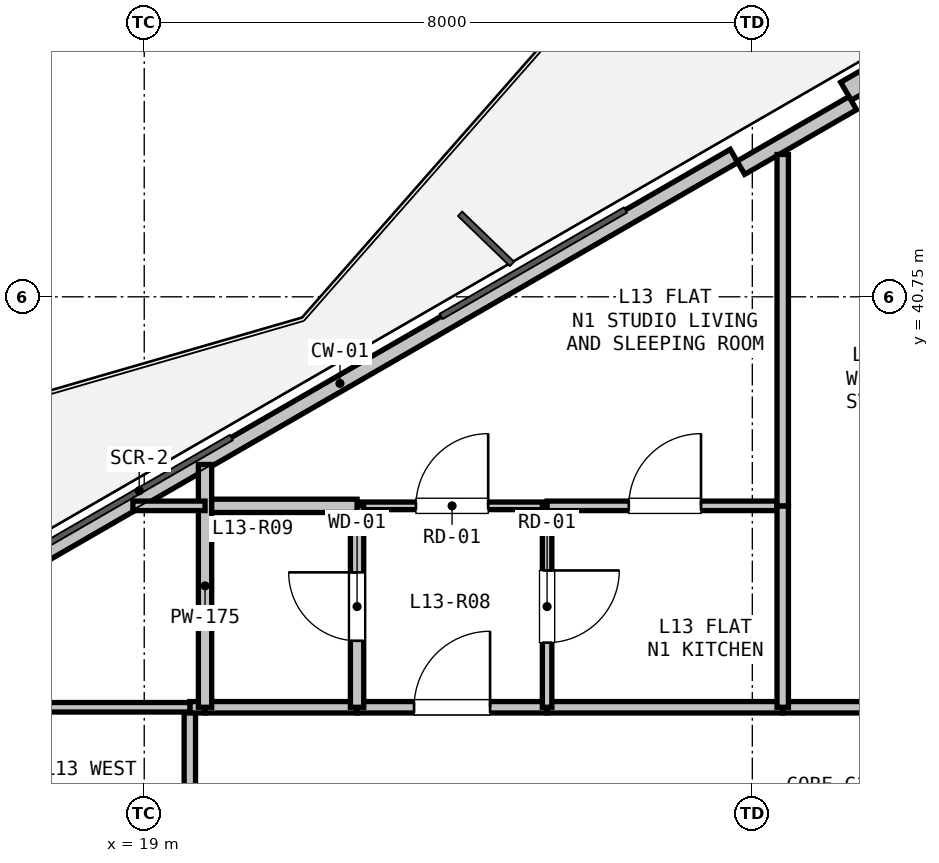
"""IFC4 building model, lengths in metres.
Left out: names, types, materials, properties, quantities, classifications, styles, units other than length and angle.
Written with IfcOpenShell. Run it as: python <this file> out.ifc"""

import sys

from ifc_helpers import new_model, si_unit, direction, frame, frame_2d, origin, place, context, subcontext, project, spatial, rectangle, extrude, element, fill, save


model = new_model("IFC4")
c1 = context("Model", 3, precision=1e-05, world=origin(), true_north=direction((0.0, 1.0)))
c2 = subcontext(c1, "Body", "Model", "MODEL_VIEW")
j1 = project(units=[si_unit("LENGTHUNIT", "METRE"), si_unit("PLANEANGLEUNIT", "RADIAN")], contexts=[c1])
p1 = place(None, origin())
s1 = spatial("IfcSite", under=j1, at=p1, CompositionType="ELEMENT")
p2 = place(p1, origin())
s2 = spatial("IfcBuilding", under=s1, at=p2, CompositionType="ELEMENT")
p3 = place(p2, frame((0.0, 0.0, 48.9)))
s3 = spatial("IfcBuildingStorey", under=s2, at=p3, CompositionType="ELEMENT", Elevation=48.9)
p4 = place(p3, frame((16.39, 36.617, 0.0), z_axis=(0.0, 0.0, 1.0), x_axis=(0.866027351828, 0.499996625875, 0.0)))
e1 = element("IfcWall", 1, at=p4, inside=s3, PredefinedType="PARAPET", context=c2, shape_type="SweptSolid", body=[
    extrude(rectangle(XDim=11.973, YDim=0.2, at=frame_2d((5.987, 0.0))), origin(), (0.0, 0.0, 1.0), 0.2),
])
p5 = place(p3, frame((28.232, 43.454, 0.0), z_axis=(0.0, 0.0, 1.0), x_axis=(0.86603192154, 0.499988710747, 0.0)))
e2 = element("IfcWall", 2, at=p5, inside=s3, PredefinedType="SOLIDWALL", context=c2, shape_type="SweptSolid", body=[
    extrude(rectangle(XDim=12.673, YDim=0.275, at=frame_2d((6.336, 0.0))), origin(), (0.0, 0.0, 1.0), 2.66),
])
p6 = place(p5, frame((7.294, 0.0, 0.9)))
e3 = element("IfcOpeningElement", 3, at=p6, cuts=e2, PredefinedType="OPENING", context=c2, shape_type="SweptSolid", body=[
    extrude(rectangle(XDim=1.2, YDim=1.4, at=frame_2d((0.6, 0.7))), frame((0.0, 0.147, 0.0), z_axis=(0.0, -1.0, 0.0), x_axis=(1.0, 0.0, 0.0)), (0.0, 0.0, 1.0), 0.295),
])
p7 = place(p3, frame((26.85, 42.448, 0.0), z_axis=(0.0, 0.0, 1.0), x_axis=(0.86605165483, 0.499954529098, 0.0)))
e4 = element("IfcWall", 4, at=p7, inside=s3, PredefinedType="PARAPET", context=c2, shape_type="SweptSolid", body=[
    extrude(rectangle(XDim=1.7, YDim=0.2, at=frame_2d((0.85, 0.0))), origin(), (0.0, 0.0, 1.0), 2.66),
])
p8 = place(p3, frame((19.6, 29.75, 0.0), z_axis=(0.0, 0.0, 1.0), x_axis=(0.0, 1.0, 0.0)))
e5 = element("IfcWall", 5, at=p8, inside=s3, PredefinedType="PARTITIONING", context=c2, shape_type="SweptSolid", body=[
    extrude(rectangle(XDim=5.6, YDim=0.15, at=frame_2d((2.8, 0.0))), origin(), (0.0, 0.0, 1.0), 2.338),
])
p9 = place(p8, frame((2.3, 0.0, 0.0)))
e6 = element("IfcOpeningElement", 6, at=p9, cuts=e5, PredefinedType="OPENING", context=c2, shape_type="SweptSolid", body=[
    extrude(rectangle(XDim=1.0, YDim=2.15, at=frame_2d((0.5, 1.075))), frame((0.0, 0.085, 0.0), z_axis=(0.0, -1.0, 0.0), x_axis=(1.0, 0.0, 0.0)), (0.0, 0.0, 1.0), 0.17),
])
p10 = place(p3, frame((19.6, 35.35, 0.0), z_axis=(0.0, 0.0, 1.0), x_axis=(1.0, 0.0, 0.0)))
e7 = element("IfcWall", 7, at=p10, inside=s3, PredefinedType="PARTITIONING", context=c2, shape_type="SweptSolid", body=[
    extrude(rectangle(XDim=0.2, YDim=0.15, at=frame_2d((0.1, 0.0))), origin(), (0.0, 0.0, 1.0), 3.04),
])
p11 = place(p3, frame((19.8, 35.35, 0.0), z_axis=(0.0, 0.0, 1.0), x_axis=(1.0, 0.0, 0.0)))
e8 = element("IfcWall", 8, at=p11, inside=s3, PredefinedType="PARTITIONING", context=c2, shape_type="SweptSolid", body=[
    extrude(rectangle(XDim=2.0, YDim=0.15, at=frame_2d((1.0, 0.0))), origin(), (0.0, 0.0, 1.0), 3.04),
])
p12 = place(p3, frame((21.8, 35.35, 0.0), z_axis=(0.0, 0.0, 1.0), x_axis=(1.0, 0.0, 0.0)))
e9 = element("IfcWall", 9, at=p12, inside=s3, PredefinedType="PARTITIONING", context=c2, shape_type="SweptSolid", body=[
    extrude(rectangle(XDim=2.5, YDim=0.15, at=frame_2d((1.25, 0.0))), origin(), (0.0, 0.0, 1.0), 3.04),
])
p13 = place(p12, frame((0.75, 0.0, 0.0)))
e10 = element("IfcOpeningElement", 10, at=p13, cuts=e9, PredefinedType="OPENING", context=c2, shape_type="SweptSolid", body=[
    extrude(rectangle(XDim=1.0, YDim=2.15, at=frame_2d((0.5, 1.075))), frame((0.0, 0.085, 0.0), z_axis=(0.0, -1.0, 0.0), x_axis=(1.0, 0.0, 0.0)), (0.0, 0.0, 1.0), 0.17),
])
p14 = place(p3, frame((24.3, 35.35, 0.0), z_axis=(0.0, 0.0, 1.0), x_axis=(1.0, 0.0, 0.0)))
e11 = element("IfcWall", 11, at=p14, inside=s3, PredefinedType="PARTITIONING", context=c2, shape_type="SweptSolid", body=[
    extrude(rectangle(XDim=3.1, YDim=0.15, at=frame_2d((1.55, 0.0))), origin(), (0.0, 0.0, 1.0), 3.04),
])
p15 = place(p3, frame((27.4, 35.35, 0.0), z_axis=(0.0, 0.0, 1.0), x_axis=(1.0, 0.0, 0.0)))
e12 = element("IfcWall", 12, at=p15, inside=s3, PredefinedType="PARTITIONING", context=c2, shape_type="SweptSolid", body=[
    extrude(rectangle(XDim=3.2, YDim=0.15, at=frame_2d((1.6, 0.0))), origin(), (0.0, 0.0, 1.0), 3.04),
])
p16 = place(p15, frame((1.1, 0.0, 0.0)))
e13 = element("IfcOpeningElement", 13, at=p16, cuts=e12, PredefinedType="OPENING", context=c2, shape_type="SweptSolid", body=[
    extrude(rectangle(XDim=1.0, YDim=2.15, at=frame_2d((0.5, 1.075))), frame((0.0, 0.085, 0.0), z_axis=(0.0, -1.0, 0.0), x_axis=(1.0, 0.0, 0.0)), (0.0, 0.0, 1.0), 0.17),
])
p17 = place(p3, frame((21.8, 38.0, 0.0), z_axis=(0.0, 0.0, 1.0), x_axis=(1.0, 0.0, 0.0)))
e14 = element("IfcWall", 14, at=p17, inside=s3, PredefinedType="PARTITIONING", context=c2, shape_type="SweptSolid", body=[
    extrude(rectangle(XDim=2.5, YDim=0.1, at=frame_2d((1.25, 0.0))), origin(), (0.0, 0.0, 1.0), 3.04),
])
p18 = place(p17, frame((0.775, 0.0, 0.0)))
e15 = element("IfcOpeningElement", 15, at=p18, cuts=e14, PredefinedType="OPENING", context=c2, shape_type="SweptSolid", body=[
    extrude(rectangle(XDim=0.95, YDim=2.1, at=frame_2d((0.475, 1.05))), frame((0.0, 0.06, 0.0), z_axis=(0.0, -1.0, 0.0), x_axis=(1.0, 0.0, 0.0)), (0.0, 0.0, 1.0), 0.12),
])
p19 = place(p3, frame((24.3, 38.0, 0.0), z_axis=(0.0, 0.0, 1.0), x_axis=(0.0, -1.0, 0.0)))
e16 = element("IfcWall", 16, at=p19, inside=s3, PredefinedType="PARTITIONING", context=c2, shape_type="SweptSolid", body=[
    extrude(rectangle(XDim=2.65, YDim=0.125, at=frame_2d((1.325, 0.0))), origin(), (0.0, 0.0, 1.0), 3.04),
])
p20 = place(p19, frame((0.85, 0.0, 0.0)))
e17 = element("IfcOpeningElement", 17, at=p20, cuts=e16, PredefinedType="OPENING", context=c2, shape_type="SweptSolid", body=[
    extrude(rectangle(XDim=0.95, YDim=2.1, at=frame_2d((0.475, 1.05))), frame((0.0, 0.073, 0.0), z_axis=(0.0, -1.0, 0.0), x_axis=(1.0, 0.0, 0.0)), (0.0, 0.0, 1.0), 0.145),
])
p21 = place(p3, frame((21.8, 35.35, 0.0), z_axis=(0.0, 0.0, 1.0), x_axis=(0.0, 1.0, 0.0)))
e18 = element("IfcWall", 18, at=p21, inside=s3, PredefinedType="PLUMBINGWALL", context=c2, shape_type="SweptSolid", body=[
    extrude(rectangle(XDim=2.65, YDim=0.175, at=frame_2d((1.325, 0.0))), origin(), (0.0, 0.0, 1.0), 3.04),
])
p22 = place(p21, frame((0.875, 0.0, 0.0)))
e19 = element("IfcOpeningElement", 19, at=p22, cuts=e18, PredefinedType="OPENING", context=c2, shape_type="SweptSolid", body=[
    extrude(rectangle(XDim=0.9, YDim=2.1, at=frame_2d((0.45, 1.05))), frame((0.0, 0.097, 0.0), z_axis=(0.0, -1.0, 0.0), x_axis=(1.0, 0.0, 0.0)), (0.0, 0.0, 1.0), 0.195),
])
p23 = place(p3, frame((19.8, 38.0, 0.0), z_axis=(0.0, 0.0, 1.0), x_axis=(1.0, 0.0, 0.0)))
e20 = element("IfcWall", 20, at=p23, inside=s3, PredefinedType="PLUMBINGWALL", context=c2, shape_type="SweptSolid", body=[
    extrude(rectangle(XDim=2.0, YDim=0.175, at=frame_2d((1.0, 0.0))), origin(), (0.0, 0.0, 1.0), 2.365),
])
p24 = place(p3, frame((19.8, 35.35, 0.0), z_axis=(0.0, 0.0, 1.0), x_axis=(0.0, 1.0, 0.0)))
e21 = element("IfcWall", 21, at=p24, inside=s3, PredefinedType="PLUMBINGWALL", context=c2, shape_type="SweptSolid", body=[
    extrude(rectangle(XDim=3.194, YDim=0.175, at=frame_2d((1.597, 0.0))), origin(), (0.0, 0.0, 1.0), 2.365),
])
p25 = place(p3, frame((24.3, 38.0, 0.0), z_axis=(0.0, 0.0, 1.0), x_axis=(1.0, 0.0, 0.0)))
e22 = element("IfcWall", 22, at=p25, inside=s3, PredefinedType="PARTITIONING", context=c2, shape_type="SweptSolid", body=[
    extrude(rectangle(XDim=3.1, YDim=0.125, at=frame_2d((1.55, 0.0))), origin(), (0.0, 0.0, 1.0), 3.04),
])
p26 = place(p25, frame((1.075, 0.0, 0.0)))
e23 = element("IfcOpeningElement", 23, at=p26, cuts=e22, PredefinedType="OPENING", context=c2, shape_type="SweptSolid", body=[
    extrude(rectangle(XDim=0.95, YDim=2.1, at=frame_2d((0.475, 1.05))), frame((0.0, 0.073, 0.0), z_axis=(0.0, -1.0, 0.0), x_axis=(1.0, 0.0, 0.0)), (0.0, 0.0, 1.0), 0.145),
])
p27 = place(p3, frame((27.4, 38.0, 0.0), z_axis=(0.0, 0.0, 1.0), x_axis=(0.0, -1.0, 0.0)))
e24 = element("IfcWall", 24, at=p27, inside=s3, PredefinedType="PARTITIONING", context=c2, shape_type="SweptSolid", body=[
    extrude(rectangle(XDim=2.65, YDim=0.15, at=frame_2d((1.325, 0.0))), origin(), (0.0, 0.0, 1.0), 3.04),
])
p28 = place(p3, frame((27.4, 38.0, 0.0), z_axis=(0.0, 0.0, 1.0), x_axis=(0.0, 1.0, 0.0)))
e25 = element("IfcWall", 25, at=p28, inside=s3, PredefinedType="PARTITIONING", context=c2, shape_type="SweptSolid", body=[
    extrude(rectangle(XDim=4.623, YDim=0.15, at=frame_2d((2.311, 0.0))), origin(), (0.0, 0.0, 1.0), 2.365),
])
p29 = place(p3, frame((17.15, 35.35, 0.0), z_axis=(0.0, 0.0, 1.0), x_axis=(1.0, 0.0, 0.0)))
e26 = element("IfcWall", 26, at=p29, inside=s3, PredefinedType="PARTITIONING", context=c2, shape_type="SweptSolid", body=[
    extrude(rectangle(XDim=2.45, YDim=0.125, at=frame_2d((1.225, 0.0))), origin(), (0.0, 0.0, 1.0), 3.04),
])
p30 = place(p3, frame((19.8, 38.0, 0.0), z_axis=(0.0, 0.0, 1.0), x_axis=(-1.0, 0.0, 0.0)))
e27 = element("IfcWall", 27, at=p30, inside=s3, PredefinedType="PARTITIONING", context=c2, shape_type="SweptSolid", body=[
    extrude(rectangle(XDim=0.949, YDim=0.125, at=frame_2d((0.475, 0.0))), origin(), (0.0, 0.0, 1.0), 2.365),
])
p31 = place(p13, origin())
e28 = element("IfcDoor", 28, at=p31, inside=s3, OperationType="SINGLE_SWING_RIGHT", PredefinedType="DOOR", context=c2, shape_type="SweptSolid", body=[
    extrude(rectangle(XDim=1.0, YDim=2.15, at=frame_2d((0.5, 1.075))), frame((0.0, 0.025, 0.0), z_axis=(0.0, -1.0, 0.0), x_axis=(1.0, 0.0, 0.0)), (0.0, 0.0, 1.0), 0.05),
])
fill(e10, e28)
p32 = place(p22, origin())
e29 = element("IfcDoor", 29, at=p32, inside=s3, OperationType="SINGLE_SWING_RIGHT", PredefinedType="DOOR", context=c2, shape_type="SweptSolid", body=[
    extrude(rectangle(XDim=0.9, YDim=2.1, at=frame_2d((0.45, 1.05))), frame((0.0, 0.025, 0.0), z_axis=(0.0, -1.0, 0.0), x_axis=(1.0, 0.0, 0.0)), (0.0, 0.0, 1.0), 0.05),
])
fill(e19, e29)
p33 = place(p20, origin())
e30 = element("IfcDoor", 30, at=p33, inside=s3, OperationType="SINGLE_SWING_LEFT", PredefinedType="DOOR", context=c2, shape_type="SweptSolid", body=[
    extrude(rectangle(XDim=0.95, YDim=2.1, at=frame_2d((0.475, 1.05))), frame((0.0, 0.025, 0.0), z_axis=(0.0, -1.0, 0.0), x_axis=(1.0, 0.0, 0.0)), (0.0, 0.0, 1.0), 0.05),
])
fill(e17, e30)
p34 = place(p18, origin())
e31 = element("IfcDoor", 31, at=p34, inside=s3, OperationType="SINGLE_SWING_RIGHT", PredefinedType="DOOR", context=c2, shape_type="SweptSolid", body=[
    extrude(rectangle(XDim=0.95, YDim=2.1, at=frame_2d((0.475, 1.05))), frame((0.0, 0.025, 0.0), z_axis=(0.0, -1.0, 0.0), x_axis=(1.0, 0.0, 0.0)), (0.0, 0.0, 1.0), 0.05),
])
fill(e15, e31)
p35 = place(p26, origin())
e32 = element("IfcDoor", 32, at=p35, inside=s3, OperationType="SINGLE_SWING_RIGHT", PredefinedType="DOOR", context=c2, shape_type="SweptSolid", body=[
    extrude(rectangle(XDim=0.95, YDim=2.1, at=frame_2d((0.475, 1.05))), frame((0.0, 0.025, 0.0), z_axis=(0.0, -1.0, 0.0), x_axis=(1.0, 0.0, 0.0)), (0.0, 0.0, 1.0), 0.05),
])
fill(e23, e32)
save(model, sys.argv[1])
